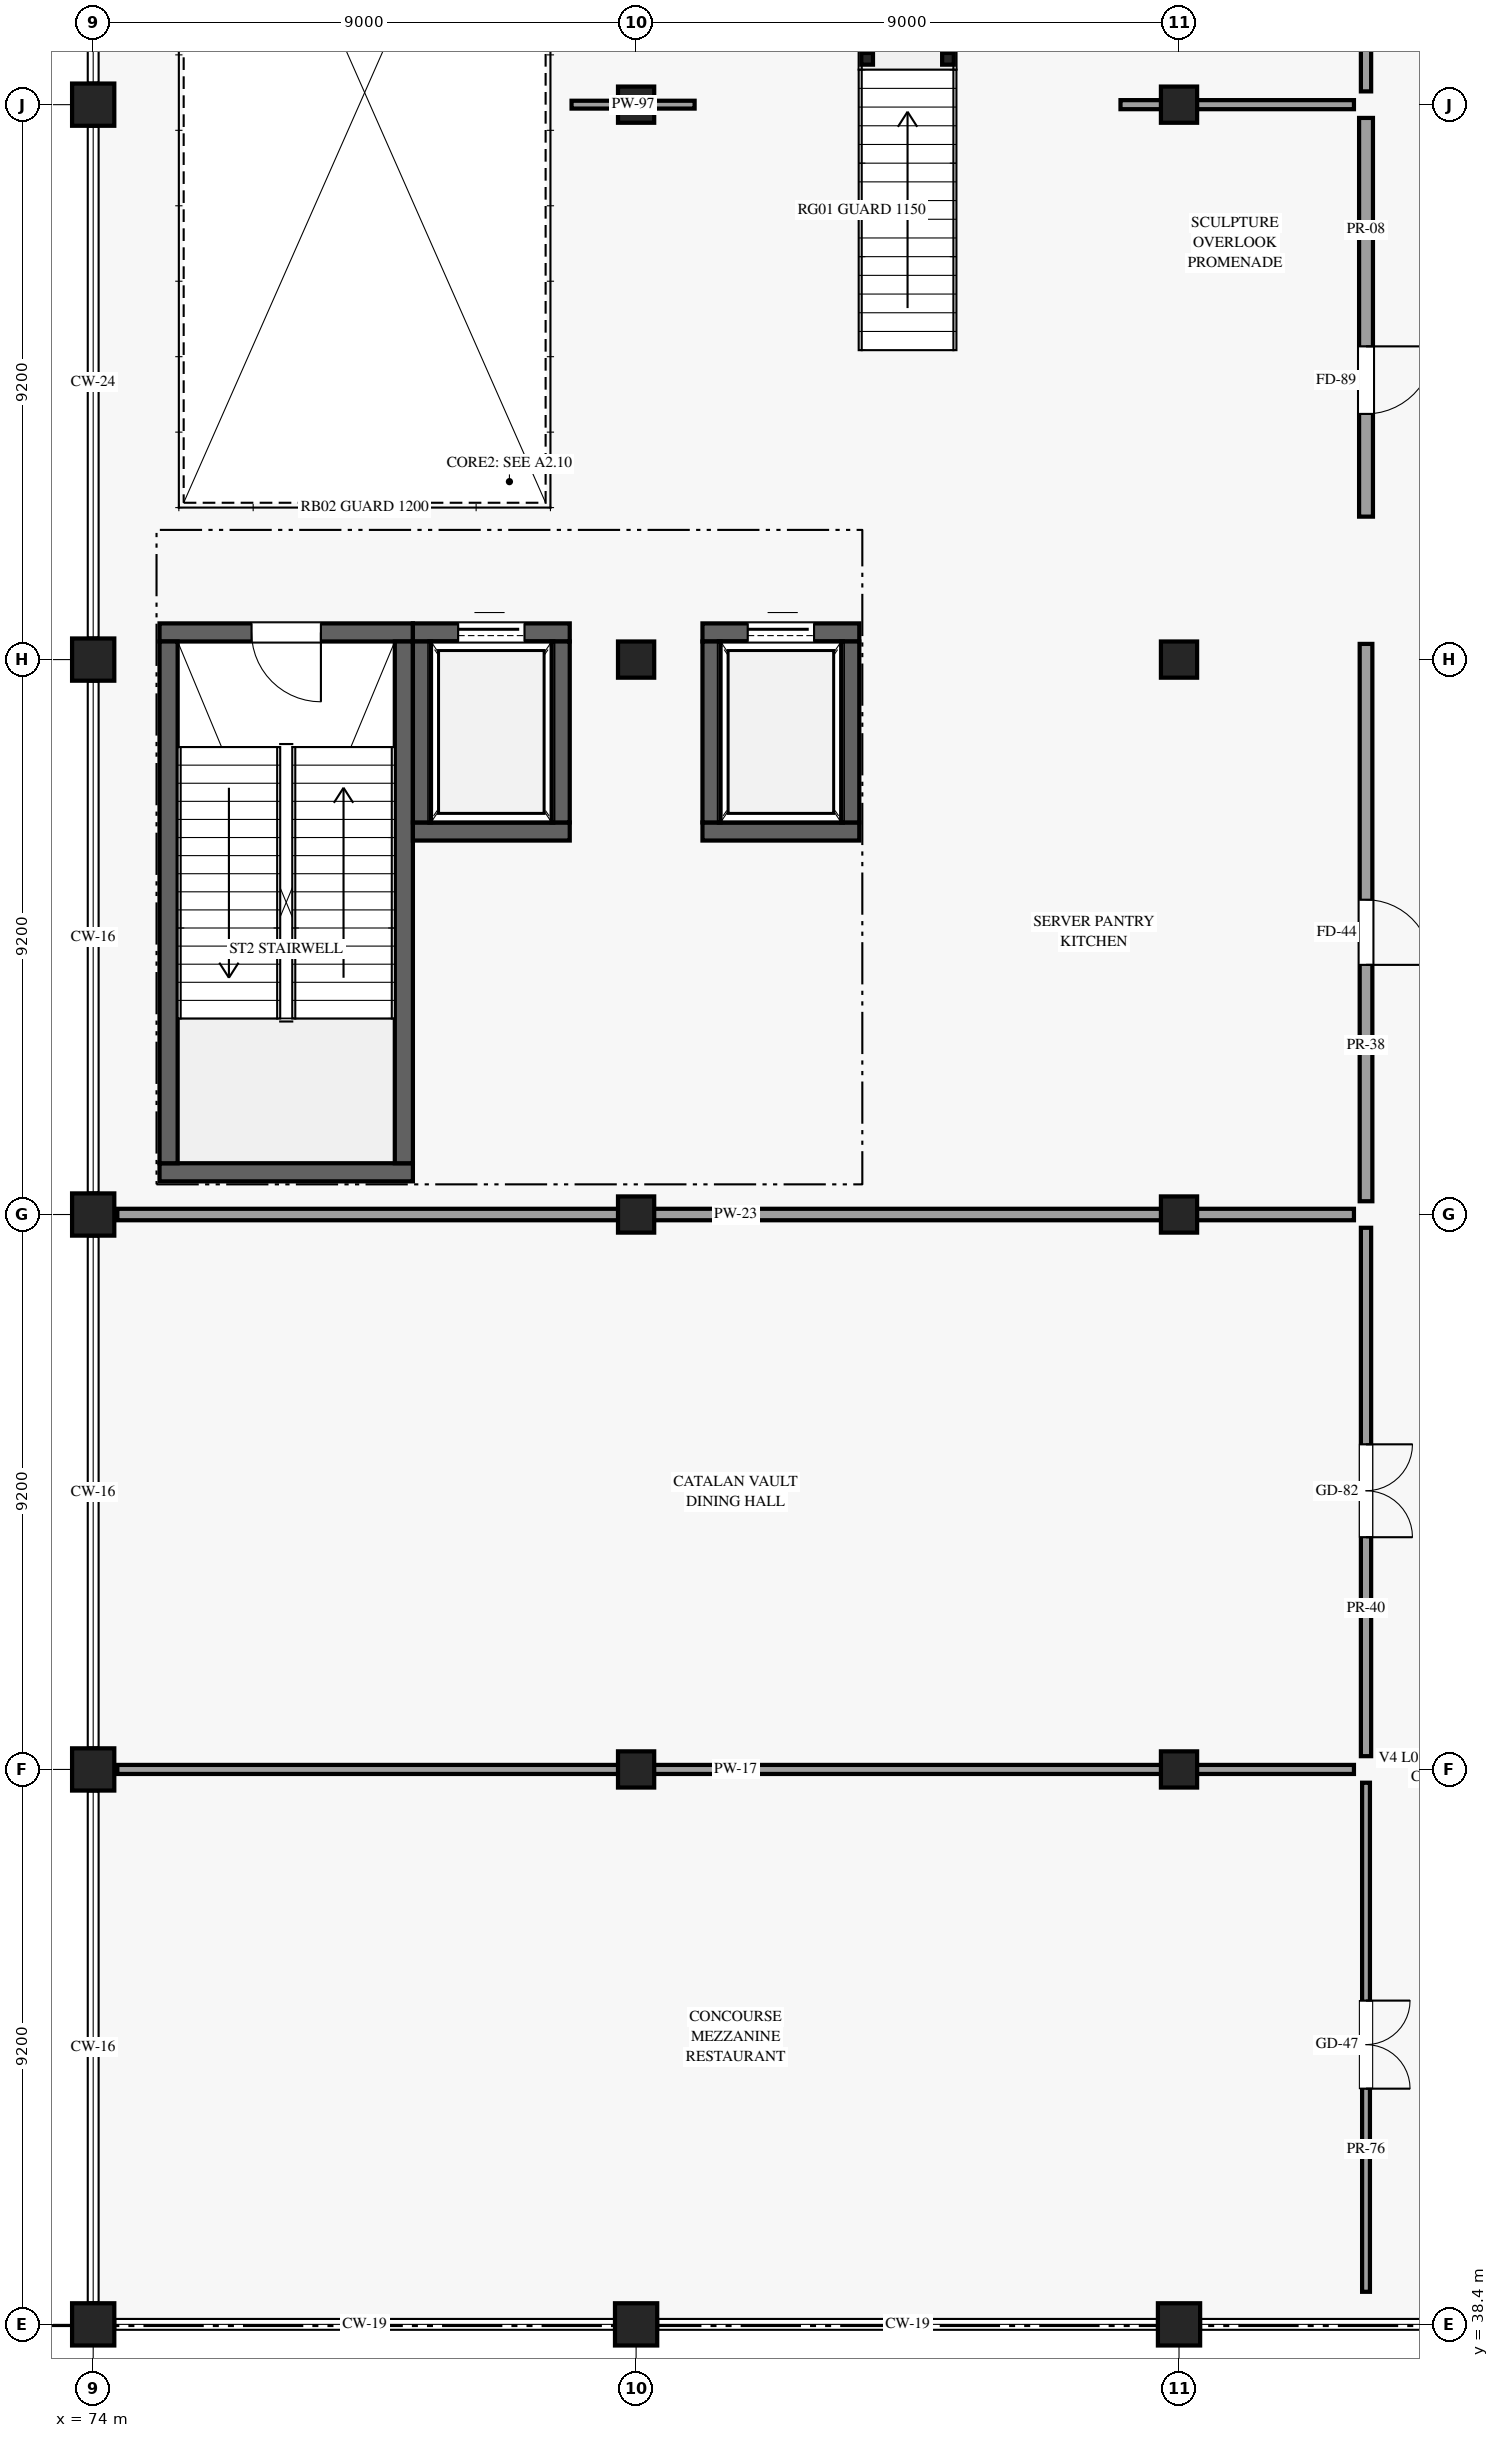
"""IFC4 building model, lengths in metres.
Left out: names, types, materials, properties, quantities, classifications, styles, units other than length and angle.
Written with IfcOpenShell. Run it as: python <this file> out.ifc"""

import sys

from ifc_helpers import new_model, si_unit, direction, frame, frame_2d, origin, origin_2d, place, context, subcontext, project, spatial, rectangle, hollow_circle, extrude, element, fill, save


model = new_model("IFC4")
c1 = context("Model", 3, precision=1e-05, world=origin(), true_north=direction((0.0, 1.0)))
c2 = subcontext(c1, "Body", "Model", "MODEL_VIEW")
j1 = project(units=[si_unit("LENGTHUNIT", "METRE"), si_unit("PLANEANGLEUNIT", "RADIAN")], contexts=[c1])
p1 = place(None, origin())
s1 = spatial("IfcSite", under=j1, at=p1, CompositionType="ELEMENT")
p2 = place(p1, origin())
s2 = spatial("IfcBuilding", under=s1, at=p2, CompositionType="ELEMENT")
p3 = place(p2, frame((0.0, 0.0, 5.4)))
s3 = spatial("IfcBuildingStorey", under=s2, at=p3, CompositionType="ELEMENT", Elevation=5.4)
for number, where, z_axis, x_axis in (
    (1, (74.0, 38.4, 0.0), (0.0, 0.0, 1.0), (1.0, 0.0, 0.0)),
    (2, (74.0, 47.6, 0.0), (0.0, 0.0, 1.0), (1.0, 0.0, 0.0)),
    (3, (74.0, 56.8, 0.0), (0.0, 0.0, 1.0), (1.0, 0.0, 0.0)),
    (4, (74.0, 66.0, 0.0), (0.0, 0.0, 1.0), (1.0, 0.0, 0.0)),
    (5, (74.0, 75.2, 0.0), (0.0, 0.0, 1.0), (1.0, 0.0, 0.0)),
    (6, (83.0, 38.4, 0.0), (0.0, 0.0, 1.0), (1.0, 0.0, 0.0)),
):
    element("IfcColumn", number, at=place(p3, frame(where, z_axis=z_axis, x_axis=x_axis)), inside=s3, PredefinedType="COLUMN", context=c2, shape_type="SweptSolid", body=[
        extrude(rectangle(XDim=0.7, YDim=0.7, at=origin_2d()), origin(), (0.0, 0.0, 1.0), 4.8),
    ])
for number, where, z_axis, x_axis in (
    (7, (83.0, 47.6, 0.0), (0.0, 0.0, 1.0), (1.0, 0.0, 0.0)),
    (8, (83.0, 56.8, 0.0), (0.0, 0.0, 1.0), (1.0, 0.0, 0.0)),
    (9, (83.0, 66.0, 0.0), (0.0, 0.0, 1.0), (1.0, 0.0, 0.0)),
    (10, (83.0, 75.2, 0.0), (0.0, 0.0, 1.0), (1.0, 0.0, 0.0)),
):
    element("IfcColumn", number, at=place(p3, frame(where, z_axis=z_axis, x_axis=x_axis)), inside=s3, PredefinedType="COLUMN", context=c2, shape_type="SweptSolid", body=[
        extrude(rectangle(XDim=0.6, YDim=0.6, at=origin_2d()), origin(), (0.0, 0.0, 1.0), 4.8),
    ])
p4 = place(p3, frame((92.0, 38.4, 0.0), z_axis=(0.0, 0.0, 1.0), x_axis=(1.0, 0.0, 0.0)))
e11 = element("IfcColumn", 11, at=p4, inside=s3, PredefinedType="COLUMN", context=c2, shape_type="SweptSolid", body=[
    extrude(rectangle(XDim=0.7, YDim=0.7, at=origin_2d()), origin(), (0.0, 0.0, 1.0), 4.8),
])
for number, where, z_axis, x_axis in (
    (12, (92.0, 47.6, 0.0), (0.0, 0.0, 1.0), (1.0, 0.0, 0.0)),
    (13, (92.0, 56.8, 0.0), (0.0, 0.0, 1.0), (1.0, 0.0, 0.0)),
    (14, (92.0, 66.0, 0.0), (0.0, 0.0, 1.0), (1.0, 0.0, 0.0)),
    (15, (92.0, 75.2, 0.0), (0.0, 0.0, 1.0), (1.0, 0.0, 0.0)),
):
    element("IfcColumn", number, at=place(p3, frame(where, z_axis=z_axis, x_axis=x_axis)), inside=s3, PredefinedType="COLUMN", context=c2, shape_type="SweptSolid", body=[
        extrude(rectangle(XDim=0.6, YDim=0.6, at=origin_2d()), origin(), (0.0, 0.0, 1.0), 4.8),
    ])
p5 = place(p3, frame((75.1, 66.45, 0.0), z_axis=(0.0, 0.0, 1.0), x_axis=(1.0, 0.0, 0.0)))
e16 = element("IfcWall", 16, at=p5, inside=s3, PredefinedType="SHEAR", context=c2, shape_type="SweptSolid", body=[
    extrude(rectangle(XDim=4.2, YDim=0.3, at=frame_2d((2.1, 0.0))), origin(), (0.0, 0.0, 1.0), 4.44),
])
p6 = place(p5, frame((2.675, 0.0, 0.0), z_axis=(0.0, 0.0, 1.0), x_axis=(-1.0, 0.0, 0.0)))
e17 = element("IfcOpeningElement", 17, at=p6, cuts=e16, PredefinedType="OPENING", context=c2, shape_type="SweptSolid", body=[
    extrude(rectangle(XDim=1.15, YDim=2.2, at=frame_2d((0.575, 1.1))), frame((0.0, 0.16, 0.0), z_axis=(0.0, -1.0, 0.0), x_axis=(1.0, 0.0, 0.0)), (0.0, 0.0, 1.0), 0.32),
])
p7 = place(p3, frame((75.1, 57.5, 0.0), z_axis=(0.0, 0.0, 1.0), x_axis=(1.0, 0.0, 0.0)))
e18 = element("IfcWall", 18, at=p7, inside=s3, PredefinedType="SHEAR", context=c2, shape_type="SweptSolid", body=[
    extrude(rectangle(XDim=4.2, YDim=0.3, at=frame_2d((2.1, 0.0))), origin(), (0.0, 0.0, 1.0), 4.44),
])
for number, where, z_axis, x_axis in (
    (19, (75.25, 57.65, 0.0), (0.0, 0.0, 1.0), (0.0, 1.0, 0.0)),
    (20, (79.15, 57.65, 0.0), (0.0, 0.0, 1.0), (0.0, 1.0, 0.0)),
):
    element("IfcWall", number, at=place(p3, frame(where, z_axis=z_axis, x_axis=x_axis)), inside=s3, PredefinedType="SHEAR", context=c2, shape_type="SweptSolid", body=[
        extrude(rectangle(XDim=8.65, YDim=0.3, at=frame_2d((4.325, 0.0))), origin(), (0.0, 0.0, 1.0), 4.44),
    ])
p8 = place(p3, frame((79.3, 66.45, 0.0), z_axis=(0.0, 0.0, 1.0), x_axis=(1.0, 0.0, 0.0)))
e21 = element("IfcWall", 21, at=p8, inside=s3, PredefinedType="SHEAR", context=c2, shape_type="SweptSolid", body=[
    extrude(rectangle(XDim=2.6, YDim=0.3, at=frame_2d((1.3, 0.0))), origin(), (0.0, 0.0, 1.0), 4.44),
])
p9 = place(p8, frame((0.75, 0.0, 0.0)))
e22 = element("IfcOpeningElement", 22, at=p9, cuts=e21, PredefinedType="OPENING", context=c2, shape_type="SweptSolid", body=[
    extrude(rectangle(XDim=1.1, YDim=2.2, at=frame_2d((0.55, 1.1))), frame((0.0, 0.16, 0.0), z_axis=(0.0, -1.0, 0.0), x_axis=(1.0, 0.0, 0.0)), (0.0, 0.0, 1.0), 0.32),
])
p10 = place(p3, frame((79.3, 63.15, 0.0), z_axis=(0.0, 0.0, 1.0), x_axis=(1.0, 0.0, 0.0)))
e23 = element("IfcWall", 23, at=p10, inside=s3, PredefinedType="SHEAR", context=c2, shape_type="SweptSolid", body=[
    extrude(rectangle(XDim=2.6, YDim=0.3, at=frame_2d((1.3, 0.0))), origin(), (0.0, 0.0, 1.0), 4.44),
])
for number, where, z_axis, x_axis in (
    (24, (81.75, 63.3, 0.0), (0.0, 0.0, 1.0), (0.0, 1.0, 0.0)),
    (25, (79.45, 63.3, 0.0), (0.0, 0.0, 1.0), (0.0, 1.0, 0.0)),
):
    element("IfcWall", number, at=place(p3, frame(where, z_axis=z_axis, x_axis=x_axis)), inside=s3, PredefinedType="SHEAR", context=c2, shape_type="SweptSolid", body=[
        extrude(rectangle(XDim=3.0, YDim=0.3, at=frame_2d((1.5, 0.0))), origin(), (0.0, 0.0, 1.0), 4.44),
    ])
p11 = place(p3, frame((84.1, 66.45, 0.0), z_axis=(0.0, 0.0, 1.0), x_axis=(1.0, 0.0, 0.0)))
e26 = element("IfcWall", 26, at=p11, inside=s3, PredefinedType="SHEAR", context=c2, shape_type="SweptSolid", body=[
    extrude(rectangle(XDim=2.6, YDim=0.3, at=frame_2d((1.3, 0.0))), origin(), (0.0, 0.0, 1.0), 4.44),
])
p12 = place(p11, frame((0.75, 0.0, 0.0)))
e27 = element("IfcOpeningElement", 27, at=p12, cuts=e26, PredefinedType="OPENING", context=c2, shape_type="SweptSolid", body=[
    extrude(rectangle(XDim=1.1, YDim=2.2, at=frame_2d((0.55, 1.1))), frame((0.0, 0.16, 0.0), z_axis=(0.0, -1.0, 0.0), x_axis=(1.0, 0.0, 0.0)), (0.0, 0.0, 1.0), 0.32),
])
p13 = place(p3, frame((84.1, 63.15, 0.0), z_axis=(0.0, 0.0, 1.0), x_axis=(1.0, 0.0, 0.0)))
e28 = element("IfcWall", 28, at=p13, inside=s3, PredefinedType="SHEAR", context=c2, shape_type="SweptSolid", body=[
    extrude(rectangle(XDim=2.6, YDim=0.3, at=frame_2d((1.3, 0.0))), origin(), (0.0, 0.0, 1.0), 4.44),
])
for number, where, z_axis, x_axis in (
    (29, (86.55, 63.3, 0.0), (0.0, 0.0, 1.0), (0.0, 1.0, 0.0)),
    (30, (84.25, 63.3, 0.0), (0.0, 0.0, 1.0), (0.0, 1.0, 0.0)),
):
    element("IfcWall", number, at=place(p3, frame(where, z_axis=z_axis, x_axis=x_axis)), inside=s3, PredefinedType="SHEAR", context=c2, shape_type="SweptSolid", body=[
        extrude(rectangle(XDim=3.0, YDim=0.3, at=frame_2d((1.5, 0.0))), origin(), (0.0, 0.0, 1.0), 4.44),
    ])
for number, where, z_axis, x_axis in (
    (31, (86.83, 75.96, -0.34), (0.0, 0.0, 1.0), (1.0, 0.0, 0.0)),
    (32, (88.17, 75.96, -0.34), (0.0, 0.0, 1.0), (1.0, 0.0, 0.0)),
):
    element("IfcColumn", number, at=place(p3, frame(where, z_axis=z_axis, x_axis=x_axis)), inside=s3, PredefinedType="COLUMN", context=c2, shape_type="SweptSolid", body=[
        extrude(hollow_circle(Radius=0.097, WallThickness=0.008, at=origin_2d()), origin(), (0.0, 0.0, 1.0), 2.5),
    ])
p14 = place(p3, frame((95.1, 38.94, 0.0), z_axis=(0.0, 0.0, 1.0), x_axis=(0.0, 1.0, 0.0)))
e33 = element("IfcWall", 33, at=p14, inside=s3, PredefinedType="PARTITIONING", context=c2, shape_type="SweptSolid", body=[
    extrude(rectangle(XDim=8.44, YDim=0.13, at=frame_2d((4.22, 0.0))), origin(), (0.0, 0.0, 1.0), 3.675),
])
p15 = place(p14, frame((4.828, 0.0, 0.0), z_axis=(0.0, 0.0, 1.0), x_axis=(-1.0, 0.0, 0.0)))
e34 = element("IfcOpeningElement", 34, at=p15, cuts=e33, PredefinedType="OPENING", context=c2, shape_type="SweptSolid", body=[
    extrude(rectangle(XDim=1.46, YDim=2.32, at=frame_2d((0.73, 1.16))), frame((0.0, 0.075, 0.0), z_axis=(0.0, -1.0, 0.0), x_axis=(1.0, 0.0, 0.0)), (0.0, 0.0, 1.0), 0.15),
])
p16 = place(p3, frame((74.4, 47.6, 0.0), z_axis=(0.0, 0.0, 1.0), x_axis=(1.0, 0.0, 0.0)))
e35 = element("IfcWall", 35, at=p16, inside=s3, PredefinedType="PARTITIONING", context=c2, shape_type="SweptSolid", body=[
    extrude(rectangle(XDim=20.5, YDim=0.15, at=frame_2d((10.25, 0.0))), origin(), (0.0, 0.0, 1.0), 3.675),
])
p17 = place(p3, frame((95.1, 47.82, 0.0), z_axis=(0.0, 0.0, 1.0), x_axis=(0.0, 1.0, 0.0)))
e36 = element("IfcWall", 36, at=p17, inside=s3, PredefinedType="PARTITIONING", context=c2, shape_type="SweptSolid", body=[
    extrude(rectangle(XDim=8.76, YDim=0.17, at=frame_2d((4.38, 0.0))), origin(), (0.0, 0.0, 1.0), 3.675),
])
p18 = place(p17, frame((5.17, 0.0, 0.0), z_axis=(0.0, 0.0, 1.0), x_axis=(-1.0, 0.0, 0.0)))
e37 = element("IfcOpeningElement", 37, at=p18, cuts=e36, PredefinedType="OPENING", context=c2, shape_type="SweptSolid", body=[
    extrude(rectangle(XDim=1.54, YDim=2.36, at=frame_2d((0.77, 1.18))), frame((0.0, 0.095, 0.0), z_axis=(0.0, -1.0, 0.0), x_axis=(1.0, 0.0, 0.0)), (0.0, 0.0, 1.0), 0.19),
])
p19 = place(p3, frame((74.4, 56.8, 0.0), z_axis=(0.0, 0.0, 1.0), x_axis=(1.0, 0.0, 0.0)))
e38 = element("IfcWall", 38, at=p19, inside=s3, PredefinedType="PARTITIONING", context=c2, shape_type="SweptSolid", body=[
    extrude(rectangle(XDim=20.5, YDim=0.19, at=frame_2d((10.25, 0.0))), origin(), (0.0, 0.0, 1.0), 3.675),
])
p20 = place(p3, frame((95.1, 57.02, 0.0), z_axis=(0.0, 0.0, 1.0), x_axis=(0.0, 1.0, 0.0)))
e39 = element("IfcWall", 39, at=p20, inside=s3, PredefinedType="PARTITIONING", context=c2, shape_type="SweptSolid", body=[
    extrude(rectangle(XDim=9.24, YDim=0.21, at=frame_2d((4.62, 0.0))), origin(), (0.0, 0.0, 1.0), 3.675),
])
p21 = place(p20, frame((4.999, 0.0, 0.0), z_axis=(0.0, 0.0, 1.0), x_axis=(-1.0, 0.0, 0.0)))
e40 = element("IfcOpeningElement", 40, at=p21, cuts=e39, PredefinedType="OPENING", context=c2, shape_type="SweptSolid", body=[
    extrude(rectangle(XDim=1.08, YDim=2.24, at=frame_2d((0.54, 1.12))), frame((0.0, 0.115, 0.0), z_axis=(0.0, -1.0, 0.0), x_axis=(1.0, 0.0, 0.0)), (0.0, 0.0, 1.0), 0.23),
])
p22 = place(p3, frame((95.1, 68.37, 0.0), z_axis=(0.0, 0.0, 1.0), x_axis=(0.0, 1.0, 0.0)))
e41 = element("IfcWall", 41, at=p22, inside=s3, PredefinedType="PARTITIONING", context=c2, shape_type="SweptSolid", body=[
    extrude(rectangle(XDim=6.61, YDim=0.23, at=frame_2d((3.305, 0.0))), origin(), (0.0, 0.0, 1.0), 3.675),
])
p23 = place(p22, frame((2.823, 0.0, 0.0), z_axis=(0.0, 0.0, 1.0), x_axis=(-1.0, 0.0, 0.0)))
e42 = element("IfcOpeningElement", 42, at=p23, cuts=e41, PredefinedType="OPENING", context=c2, shape_type="SweptSolid", body=[
    extrude(rectangle(XDim=1.12, YDim=2.26, at=frame_2d((0.56, 1.13))), frame((0.0, 0.125, 0.0), z_axis=(0.0, -1.0, 0.0), x_axis=(1.0, 0.0, 0.0)), (0.0, 0.0, 1.0), 0.25),
])
p24 = place(p3, frame((81.93, 75.2, 0.0), z_axis=(0.0, 0.0, 1.0), x_axis=(1.0, 0.0, 0.0)))
e43 = element("IfcWall", 43, at=p24, inside=s3, PredefinedType="PARTITIONING", context=c2, shape_type="SweptSolid", body=[
    extrude(rectangle(XDim=2.04, YDim=0.13, at=frame_2d((1.02, 0.0))), origin(), (0.0, 0.0, 1.0), 3.675),
])
p25 = place(p3, frame((91.03, 75.2, 0.0), z_axis=(0.0, 0.0, 1.0), x_axis=(1.0, 0.0, 0.0)))
e44 = element("IfcWall", 44, at=p25, inside=s3, PredefinedType="PARTITIONING", context=c2, shape_type="SweptSolid", body=[
    extrude(rectangle(XDim=3.87, YDim=0.15, at=frame_2d((1.935, 0.0))), origin(), (0.0, 0.0, 1.0), 3.675),
])
p26 = place(p3, frame((95.1, 75.42, 0.0), z_axis=(0.0, 0.0, 1.0), x_axis=(0.0, 1.0, 0.0)))
e45 = element("IfcWall", 45, at=p26, inside=s3, PredefinedType="PARTITIONING", context=c2, shape_type="SweptSolid", body=[
    extrude(rectangle(XDim=8.76, YDim=0.17, at=frame_2d((4.38, 0.0))), origin(), (0.0, 0.0, 1.0), 3.675),
])
p27 = place(p26, frame((5.12, 0.0, 0.0), z_axis=(0.0, 0.0, 1.0), x_axis=(-1.0, 0.0, 0.0)))
e46 = element("IfcOpeningElement", 46, at=p27, cuts=e45, PredefinedType="OPENING", context=c2, shape_type="SweptSolid", body=[
    extrude(rectangle(XDim=1.24, YDim=2.32, at=frame_2d((0.62, 1.16))), frame((0.0, 0.095, 0.0), z_axis=(0.0, -1.0, 0.0), x_axis=(1.0, 0.0, 0.0)), (0.0, 0.0, 1.0), 0.19),
])
p28 = place(p6, origin())
e47 = element("IfcDoor", 47, at=p28, inside=s3, OperationType="SINGLE_SWING_LEFT", PredefinedType="DOOR", context=c2, shape_type="SweptSolid", body=[
    extrude(rectangle(XDim=1.15, YDim=2.2, at=frame_2d((0.575, 1.1))), frame((0.0, 0.025, 0.0), z_axis=(0.0, -1.0, 0.0), x_axis=(1.0, 0.0, 0.0)), (0.0, 0.0, 1.0), 0.05),
])
fill(e17, e47)
p29 = place(p9, origin())
e48 = element("IfcDoor", 48, at=p29, inside=s3, OperationType="SLIDING_TO_LEFT", PredefinedType="DOOR", context=c2, shape_type="SweptSolid", body=[
    extrude(rectangle(XDim=1.1, YDim=2.2, at=frame_2d((0.55, 1.1))), frame((0.0, 0.025, 0.0), z_axis=(0.0, -1.0, 0.0), x_axis=(1.0, 0.0, 0.0)), (0.0, 0.0, 1.0), 0.05),
])
fill(e22, e48)
p30 = place(p12, origin())
e49 = element("IfcDoor", 49, at=p30, inside=s3, OperationType="SLIDING_TO_RIGHT", PredefinedType="DOOR", context=c2, shape_type="SweptSolid", body=[
    extrude(rectangle(XDim=1.1, YDim=2.2, at=frame_2d((0.55, 1.1))), frame((0.0, 0.025, 0.0), z_axis=(0.0, -1.0, 0.0), x_axis=(1.0, 0.0, 0.0)), (0.0, 0.0, 1.0), 0.05),
])
fill(e27, e49)
p31 = place(p15, origin())
e50 = element("IfcDoor", 50, at=p31, inside=s3, OperationType="DOUBLE_DOOR_SINGLE_SWING", PredefinedType="DOOR", context=c2, shape_type="SweptSolid", body=[
    extrude(rectangle(XDim=1.46, YDim=2.32, at=frame_2d((0.73, 1.16))), frame((0.0, 0.025, 0.0), z_axis=(0.0, -1.0, 0.0), x_axis=(1.0, 0.0, 0.0)), (0.0, 0.0, 1.0), 0.05),
])
fill(e34, e50)
p32 = place(p18, origin())
e51 = element("IfcDoor", 51, at=p32, inside=s3, OperationType="DOUBLE_DOOR_SINGLE_SWING", PredefinedType="DOOR", context=c2, shape_type="SweptSolid", body=[
    extrude(rectangle(XDim=1.54, YDim=2.36, at=frame_2d((0.77, 1.18))), frame((0.0, 0.025, 0.0), z_axis=(0.0, -1.0, 0.0), x_axis=(1.0, 0.0, 0.0)), (0.0, 0.0, 1.0), 0.05),
])
fill(e37, e51)
p33 = place(p21, origin())
e52 = element("IfcDoor", 52, at=p33, inside=s3, OperationType="SINGLE_SWING_RIGHT", PredefinedType="DOOR", context=c2, shape_type="SweptSolid", body=[
    extrude(rectangle(XDim=1.08, YDim=2.24, at=frame_2d((0.54, 1.12))), frame((0.0, 0.025, 0.0), z_axis=(0.0, -1.0, 0.0), x_axis=(1.0, 0.0, 0.0)), (0.0, 0.0, 1.0), 0.05),
])
fill(e40, e52)
p34 = place(p23, origin())
e53 = element("IfcDoor", 53, at=p34, inside=s3, OperationType="SINGLE_SWING_LEFT", PredefinedType="DOOR", context=c2, shape_type="SweptSolid", body=[
    extrude(rectangle(XDim=1.12, YDim=2.26, at=frame_2d((0.56, 1.13))), frame((0.0, 0.025, 0.0), z_axis=(0.0, -1.0, 0.0), x_axis=(1.0, 0.0, 0.0)), (0.0, 0.0, 1.0), 0.05),
])
fill(e42, e53)
save(model, sys.argv[1])
